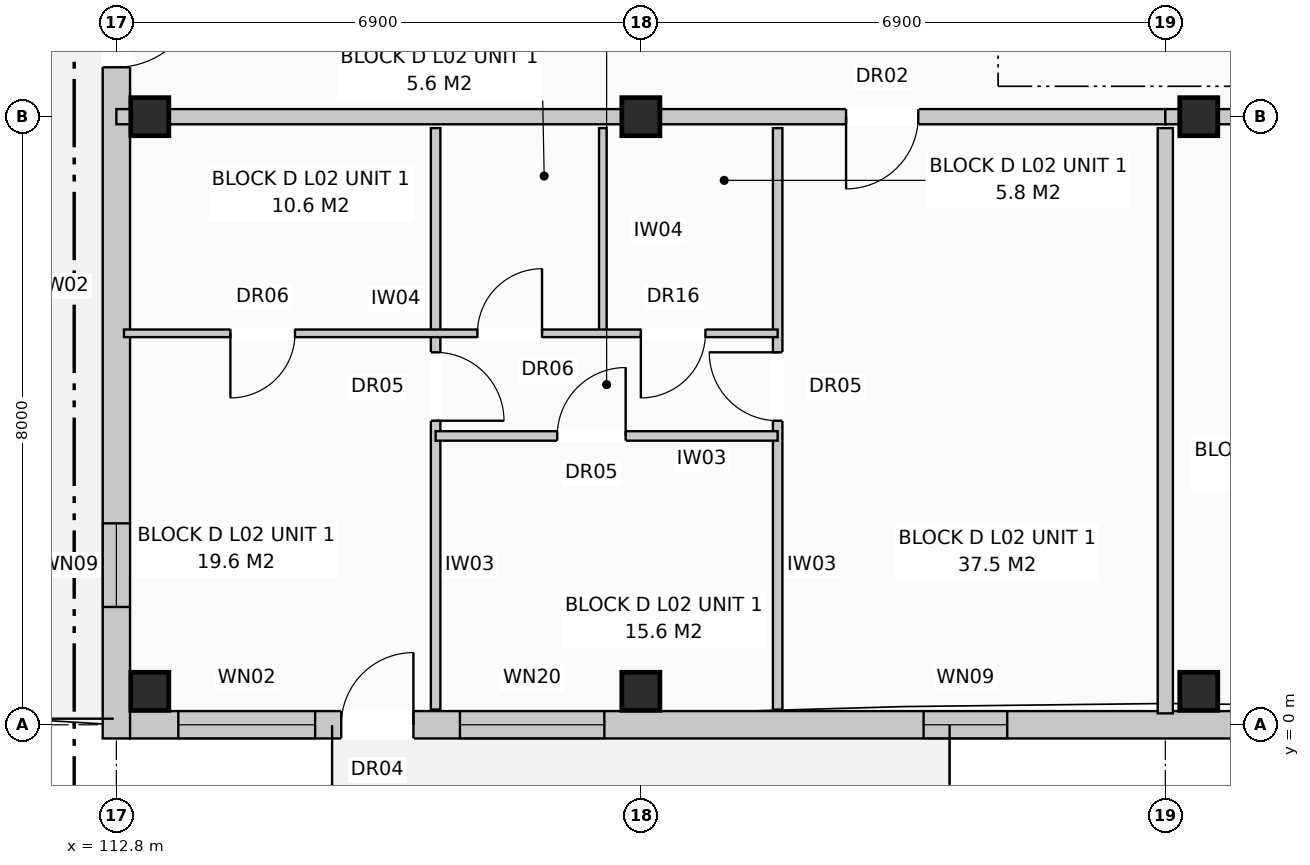
"""IFC4 building model, lengths in metres.
Left out: names, types, materials, properties, quantities, classifications, styles, units other than length and angle.
Written with IfcOpenShell. Run it as: python <this file> out.ifc"""

import sys

from ifc_helpers import new_model, si_unit, direction, frame, frame_2d, origin, origin_with_axes, origin_2d, place, context, subcontext, project, spatial, rectangle, extrude, element, fill, save


model = new_model("IFC4")
c1 = context("Model", 3, precision=1e-05, world=origin(), true_north=direction((0.0, 1.0)))
c2 = subcontext(c1, "Body", "Model", "MODEL_VIEW")
j1 = project(units=[si_unit("LENGTHUNIT", "METRE"), si_unit("PLANEANGLEUNIT", "RADIAN")], contexts=[c1])
p1 = place(None, origin())
s1 = spatial("IfcSite", under=j1, at=p1, CompositionType="ELEMENT")
p2 = place(p1, origin())
s2 = spatial("IfcBuilding", under=s1, at=p2, CompositionType="ELEMENT")
p3 = place(p2, frame((0.0, 0.0, 8.0)))
s3 = spatial("IfcBuildingStorey", under=s2, at=p3, CompositionType="ELEMENT", Elevation=8.0)
for number, where, z_axis, x_axis in (
    (1, (113.24, 0.44, 0.0), (0.0, 0.0, 1.0), (1.0, 0.0, 0.0)),
    (2, (113.24, 8.0, 0.0), (0.0, 0.0, 1.0), (1.0, 0.0, 0.0)),
    (3, (119.7, 0.44, 0.0), (0.0, 0.0, 1.0), (1.0, 0.0, 0.0)),
    (4, (119.7, 8.0, 0.0), (0.0, 0.0, 1.0), (1.0, 0.0, 0.0)),
    (5, (127.04, 0.44, 0.0), (0.0, 0.0, 1.0), (1.0, 0.0, 0.0)),
    (6, (127.04, 8.0, 0.0), (0.0, 0.0, 1.0), (1.0, 0.0, 0.0)),
):
    element("IfcColumn", number, at=place(p3, frame(where, z_axis=z_axis, x_axis=x_axis)), inside=s3, PredefinedType="COLUMN", context=c2, shape_type="SweptSolid", body=[
        extrude(rectangle(XDim=0.5, YDim=0.5, at=origin_2d()), origin(), (0.0, 0.0, 1.0), 3.2),
    ])
p4 = place(p3, frame((112.97, 0.0, 0.0), z_axis=(0.0, 0.0, 1.0), x_axis=(1.0, 0.0, 0.0)))
e7 = element("IfcWall", 7, at=p4, inside=s3, PredefinedType="STANDARD", context=c2, shape_type="SweptSolid", body=[
    extrude(rectangle(XDim=54.86, YDim=0.36, at=frame_2d((27.43, 0.0))), origin(), (0.0, 0.0, 1.0), 2.94),
])
p5 = place(p4, frame((2.788, 0.0, 0.0)))
e8 = element("IfcOpeningElement", 8, at=p5, cuts=e7, PredefinedType="OPENING", context=c2, shape_type="SweptSolid", body=[
    extrude(rectangle(XDim=0.95, YDim=2.1, at=frame_2d((0.475, 1.05))), frame((0.0, 0.192, 0.0), z_axis=(0.0, -1.0, 0.0), x_axis=(1.0, 0.0, 0.0)), (0.0, 0.0, 1.0), 0.384),
])
p6 = place(p4, frame((18.9, 0.0, 0.0)))
e9 = element("IfcOpeningElement", 9, at=p6, cuts=e7, PredefinedType="OPENING", context=c2, shape_type="SweptSolid", body=[
    extrude(rectangle(XDim=0.95, YDim=2.1, at=frame_2d((0.475, 1.05))), frame((0.0, 0.192, 0.0), z_axis=(0.0, -1.0, 0.0), x_axis=(1.0, 0.0, 0.0)), (0.0, 0.0, 1.0), 0.384),
])
p7 = place(p4, frame((30.792, 0.0, 0.0)))
e10 = element("IfcOpeningElement", 10, at=p7, cuts=e7, PredefinedType="OPENING", context=c2, shape_type="SweptSolid", body=[
    extrude(rectangle(XDim=0.95, YDim=2.1, at=frame_2d((0.475, 1.05))), frame((0.0, 0.192, 0.0), z_axis=(0.0, -1.0, 0.0), x_axis=(1.0, 0.0, 0.0)), (0.0, 0.0, 1.0), 0.384),
])
p8 = place(p4, frame((45.191, 0.0, 0.0)))
e11 = element("IfcOpeningElement", 11, at=p8, cuts=e7, PredefinedType="OPENING", context=c2, shape_type="SweptSolid", body=[
    extrude(rectangle(XDim=0.95, YDim=2.1, at=frame_2d((0.475, 1.05))), frame((0.0, 0.192, 0.0), z_axis=(0.0, -1.0, 0.0), x_axis=(1.0, 0.0, 0.0)), (0.0, 0.0, 1.0), 0.384),
])
p9 = place(p4, frame((0.645, 0.0, 0.8)))
e12 = element("IfcOpeningElement", 12, at=p9, cuts=e7, PredefinedType="OPENING", context=c2, shape_type="SweptSolid", body=[
    extrude(rectangle(XDim=1.8, YDim=1.7, at=frame_2d((0.9, 0.85))), frame((0.0, 0.192, 0.0), z_axis=(0.0, -1.0, 0.0), x_axis=(1.0, 0.0, 0.0)), (0.0, 0.0, 1.0), 0.384),
])
p10 = place(p4, frame((4.35, 0.0, 0.72)))
e13 = element("IfcOpeningElement", 13, at=p10, cuts=e7, PredefinedType="OPENING", context=c2, shape_type="SweptSolid", body=[
    extrude(rectangle(XDim=1.9, YDim=1.85, at=frame_2d((0.95, 0.925))), frame((0.0, 0.192, 0.0), z_axis=(0.0, -1.0, 0.0), x_axis=(1.0, 0.0, 0.0)), (0.0, 0.0, 1.0), 0.384),
])
p11 = place(p4, frame((10.45, 0.0, 0.72)))
e14 = element("IfcOpeningElement", 14, at=p11, cuts=e7, PredefinedType="OPENING", context=c2, shape_type="SweptSolid", body=[
    extrude(rectangle(XDim=1.1, YDim=1.5, at=frame_2d((0.55, 0.75))), frame((0.0, 0.192, 0.0), z_axis=(0.0, -1.0, 0.0), x_axis=(1.0, 0.0, 0.0)), (0.0, 0.0, 1.0), 0.384),
])
p12 = place(p4, frame((15.05, 0.0, 0.72)))
e15 = element("IfcOpeningElement", 15, at=p12, cuts=e7, PredefinedType="OPENING", context=c2, shape_type="SweptSolid", body=[
    extrude(rectangle(XDim=1.1, YDim=1.5, at=frame_2d((0.55, 0.75))), frame((0.0, 0.192, 0.0), z_axis=(0.0, -1.0, 0.0), x_axis=(1.0, 0.0, 0.0)), (0.0, 0.0, 1.0), 0.384),
])
p13 = place(p4, frame((22.75, 0.0, 0.8)))
e16 = element("IfcOpeningElement", 16, at=p13, cuts=e7, PredefinedType="OPENING", context=c2, shape_type="SweptSolid", body=[
    extrude(rectangle(XDim=1.9, YDim=1.85, at=frame_2d((0.95, 0.925))), frame((0.0, 0.192, 0.0), z_axis=(0.0, -1.0, 0.0), x_axis=(1.0, 0.0, 0.0)), (0.0, 0.0, 1.0), 0.384),
])
p14 = place(p4, frame((28.85, 0.0, 0.72)))
e17 = element("IfcOpeningElement", 17, at=p14, cuts=e7, PredefinedType="OPENING", context=c2, shape_type="SweptSolid", body=[
    extrude(rectangle(XDim=1.1, YDim=1.5, at=frame_2d((0.55, 0.75))), frame((0.0, 0.192, 0.0), z_axis=(0.0, -1.0, 0.0), x_axis=(1.0, 0.0, 0.0)), (0.0, 0.0, 1.0), 0.384),
])
p15 = place(p4, frame((34.9, 0.0, 0.8)))
e18 = element("IfcOpeningElement", 18, at=p15, cuts=e7, PredefinedType="OPENING", context=c2, shape_type="SweptSolid", body=[
    extrude(rectangle(XDim=1.8, YDim=1.7, at=frame_2d((0.9, 0.85))), frame((0.0, 0.192, 0.0), z_axis=(0.0, -1.0, 0.0), x_axis=(1.0, 0.0, 0.0)), (0.0, 0.0, 1.0), 0.384),
])
p16 = place(p4, frame((38.65, 0.0, 0.72)))
e19 = element("IfcOpeningElement", 19, at=p16, cuts=e7, PredefinedType="OPENING", context=c2, shape_type="SweptSolid", body=[
    extrude(rectangle(XDim=1.1, YDim=1.5, at=frame_2d((0.55, 0.75))), frame((0.0, 0.192, 0.0), z_axis=(0.0, -1.0, 0.0), x_axis=(1.0, 0.0, 0.0)), (0.0, 0.0, 1.0), 0.384),
])
p17 = place(p4, frame((43.35, 0.0, 0.72)))
e20 = element("IfcOpeningElement", 20, at=p17, cuts=e7, PredefinedType="OPENING", context=c2, shape_type="SweptSolid", body=[
    extrude(rectangle(XDim=1.1, YDim=1.5, at=frame_2d((0.55, 0.75))), frame((0.0, 0.192, 0.0), z_axis=(0.0, -1.0, 0.0), x_axis=(1.0, 0.0, 0.0)), (0.0, 0.0, 1.0), 0.384),
])
p18 = place(p4, frame((48.7, 0.0, 0.8)))
e21 = element("IfcOpeningElement", 21, at=p18, cuts=e7, PredefinedType="OPENING", context=c2, shape_type="SweptSolid", body=[
    extrude(rectangle(XDim=1.8, YDim=1.7, at=frame_2d((0.9, 0.85))), frame((0.0, 0.192, 0.0), z_axis=(0.0, -1.0, 0.0), x_axis=(1.0, 0.0, 0.0)), (0.0, 0.0, 1.0), 0.384),
])
p19 = place(p4, frame((52.25, 0.0, 0.72)))
e22 = element("IfcOpeningElement", 22, at=p19, cuts=e7, PredefinedType="OPENING", context=c2, shape_type="SweptSolid", body=[
    extrude(rectangle(XDim=1.1, YDim=1.5, at=frame_2d((0.55, 0.75))), frame((0.0, 0.192, 0.0), z_axis=(0.0, -1.0, 0.0), x_axis=(1.0, 0.0, 0.0)), (0.0, 0.0, 1.0), 0.384),
])
p20 = place(p3, frame((112.8, -0.18, 0.0), z_axis=(0.0, 0.0, 1.0), x_axis=(0.0, 1.0, 0.0)))
e23 = element("IfcWall", 23, at=p20, inside=s3, PredefinedType="STANDARD", context=c2, shape_type="SweptSolid", body=[
    extrude(rectangle(XDim=18.76, YDim=0.36, at=frame_2d((9.38, 0.0))), origin(), (0.0, 0.0, 1.0), 2.94),
])
p21 = place(p20, frame((8.83, 0.0, 0.0)))
e24 = element("IfcOpeningElement", 24, at=p21, cuts=e23, PredefinedType="OPENING", context=c2, shape_type="SweptSolid", body=[
    extrude(rectangle(XDim=1.1, YDim=2.1, at=frame_2d((0.55, 1.05))), frame((0.0, 0.192, 0.0), z_axis=(0.0, -1.0, 0.0), x_axis=(1.0, 0.0, 0.0)), (0.0, 0.0, 1.0), 0.384),
])
p22 = place(p20, frame((1.73, 0.0, 0.72)))
e25 = element("IfcOpeningElement", 25, at=p22, cuts=e23, PredefinedType="OPENING", context=c2, shape_type="SweptSolid", body=[
    extrude(rectangle(XDim=1.1, YDim=1.5, at=frame_2d((0.55, 0.75))), frame((0.0, 0.192, 0.0), z_axis=(0.0, -1.0, 0.0), x_axis=(1.0, 0.0, 0.0)), (0.0, 0.0, 1.0), 0.384),
])
p23 = place(p20, frame((15.93, 0.0, 0.72)))
e26 = element("IfcOpeningElement", 26, at=p23, cuts=e23, PredefinedType="OPENING", context=c2, shape_type="SweptSolid", body=[
    extrude(rectangle(XDim=1.1, YDim=1.5, at=frame_2d((0.55, 0.75))), frame((0.0, 0.192, 0.0), z_axis=(0.0, -1.0, 0.0), x_axis=(1.0, 0.0, 0.0)), (0.0, 0.0, 1.0), 0.384),
])
p24 = place(p3, frame((126.6, 7.85, 0.0), z_axis=(0.0, 0.0, 1.0), x_axis=(0.0, -1.0, 0.0)))
e27 = element("IfcWall", 27, at=p24, inside=s3, PredefinedType="PARTITIONING", context=c2, shape_type="SweptSolid", body=[
    extrude(rectangle(XDim=7.7, YDim=0.2, at=frame_2d((3.85, 0.0))), origin(), (0.0, 0.0, 1.0), 2.94),
])
p25 = place(p3, frame((112.8, 8.0, 0.0), z_axis=(0.0, 0.0, 1.0), x_axis=(1.0, 0.0, 0.0)))
e28 = element("IfcWall", 28, at=p25, inside=s3, PredefinedType="PARTITIONING", context=c2, shape_type="SweptSolid", body=[
    extrude(rectangle(XDim=13.8, YDim=0.2, at=frame_2d((6.9, 0.0))), origin(), (0.0, 0.0, 1.0), 2.38),
])
p26 = place(p25, frame((9.6, 0.0, 0.0)))
e29 = element("IfcOpeningElement", 29, at=p26, cuts=e28, PredefinedType="OPENING", context=c2, shape_type="SweptSolid", body=[
    extrude(rectangle(XDim=0.95, YDim=2.15, at=frame_2d((0.475, 1.075))), frame((0.0, 0.112, 0.0), z_axis=(0.0, -1.0, 0.0), x_axis=(1.0, 0.0, 0.0)), (0.0, 0.0, 1.0), 0.224),
])
p27 = place(p3, frame((121.5, 7.85, 0.0), z_axis=(0.0, 0.0, 1.0), x_axis=(0.0, -1.0, 0.0)))
e30 = element("IfcWall", 30, at=p27, inside=s3, PredefinedType="PARTITIONING", context=c2, shape_type="SweptSolid", body=[
    extrude(rectangle(XDim=7.65, YDim=0.125, at=frame_2d((3.825, 0.0))), origin(), (0.0, 0.0, 1.0), 2.94),
])
p28 = place(p27, frame((2.95, 0.0, 0.0)))
e31 = element("IfcOpeningElement", 31, at=p28, cuts=e30, PredefinedType="OPENING", context=c2, shape_type="SweptSolid", body=[
    extrude(rectangle(XDim=0.9, YDim=2.1, at=frame_2d((0.45, 1.05))), frame((0.0, 0.074, 0.0), z_axis=(0.0, -1.0, 0.0), x_axis=(1.0, 0.0, 0.0)), (0.0, 0.0, 1.0), 0.149),
])
p29 = place(p3, frame((117.0, 7.85, 0.0), z_axis=(0.0, 0.0, 1.0), x_axis=(0.0, -1.0, 0.0)))
e32 = element("IfcWall", 32, at=p29, inside=s3, PredefinedType="PARTITIONING", context=c2, shape_type="SweptSolid", body=[
    extrude(rectangle(XDim=7.65, YDim=0.125, at=frame_2d((3.825, 0.0))), origin(), (0.0, 0.0, 1.0), 2.94),
])
p30 = place(p29, frame((2.95, 0.0, 0.0)))
e33 = element("IfcOpeningElement", 33, at=p30, cuts=e32, PredefinedType="OPENING", context=c2, shape_type="SweptSolid", body=[
    extrude(rectangle(XDim=0.9, YDim=2.1, at=frame_2d((0.45, 1.05))), frame((0.0, 0.074, 0.0), z_axis=(0.0, -1.0, 0.0), x_axis=(1.0, 0.0, 0.0)), (0.0, 0.0, 1.0), 0.149),
])
p31 = place(p3, frame((119.2, 7.85, 0.0), z_axis=(0.0, 0.0, 1.0), x_axis=(0.0, -1.0, 0.0)))
e34 = element("IfcWall", 34, at=p31, inside=s3, PredefinedType="PARTITIONING", context=c2, shape_type="SweptSolid", body=[
    extrude(rectangle(XDim=2.7, YDim=0.1, at=frame_2d((1.35, 0.0))), origin(), (0.0, 0.0, 1.0), 2.94),
])
p32 = place(p3, frame((112.9, 5.15, 0.0), z_axis=(0.0, 0.0, 1.0), x_axis=(1.0, 0.0, 0.0)))
e35 = element("IfcWall", 35, at=p32, inside=s3, PredefinedType="PARTITIONING", context=c2, shape_type="SweptSolid", body=[
    extrude(rectangle(XDim=8.6, YDim=0.1, at=frame_2d((4.3, 0.0))), origin(), (0.0, 0.0, 1.0), 2.94),
])
p33 = place(p32, frame((1.4, 0.0, 0.0)))
e36 = element("IfcOpeningElement", 36, at=p33, cuts=e35, PredefinedType="OPENING", context=c2, shape_type="SweptSolid", body=[
    extrude(rectangle(XDim=0.85, YDim=2.05, at=frame_2d((0.425, 1.025))), frame((0.0, 0.062, 0.0), z_axis=(0.0, -1.0, 0.0), x_axis=(1.0, 0.0, 0.0)), (0.0, 0.0, 1.0), 0.124),
])
p34 = place(p32, frame((4.65, 0.0, 0.0)))
e37 = element("IfcOpeningElement", 37, at=p34, cuts=e35, PredefinedType="OPENING", context=c2, shape_type="SweptSolid", body=[
    extrude(rectangle(XDim=0.85, YDim=2.05, at=frame_2d((0.425, 1.025))), frame((0.0, 0.062, 0.0), z_axis=(0.0, -1.0, 0.0), x_axis=(1.0, 0.0, 0.0)), (0.0, 0.0, 1.0), 0.124),
])
p35 = place(p32, frame((6.8, 0.0, 0.0)))
e38 = element("IfcOpeningElement", 38, at=p35, cuts=e35, PredefinedType="OPENING", context=c2, shape_type="SweptSolid", body=[
    extrude(rectangle(XDim=0.85, YDim=2.1, at=frame_2d((0.425, 1.05))), frame((0.0, 0.062, 0.0), z_axis=(0.0, -1.0, 0.0), x_axis=(1.0, 0.0, 0.0)), (0.0, 0.0, 1.0), 0.124),
])
p36 = place(p3, frame((117.0, 3.8, 0.0), z_axis=(0.0, 0.0, 1.0), x_axis=(1.0, 0.0, 0.0)))
e39 = element("IfcWall", 39, at=p36, inside=s3, PredefinedType="PARTITIONING", context=c2, shape_type="SweptSolid", body=[
    extrude(rectangle(XDim=4.5, YDim=0.125, at=frame_2d((2.25, 0.0))), origin(), (0.0, 0.0, 1.0), 2.94),
])
p37 = place(p36, frame((1.6, 0.0, 0.0)))
e40 = element("IfcOpeningElement", 40, at=p37, cuts=e39, PredefinedType="OPENING", context=c2, shape_type="SweptSolid", body=[
    extrude(rectangle(XDim=0.9, YDim=2.1, at=frame_2d((0.45, 1.05))), frame((0.0, 0.074, 0.0), z_axis=(0.0, -1.0, 0.0), x_axis=(1.0, 0.0, 0.0)), (0.0, 0.0, 1.0), 0.149),
])
p38 = place(p3, frame((126.6, 8.0, 0.0), z_axis=(0.0, 0.0, 1.0), x_axis=(1.0, 0.0, 0.0)))
e41 = element("IfcWall", 41, at=p38, inside=s3, PredefinedType="PARTITIONING", context=c2, shape_type="SweptSolid", body=[
    extrude(rectangle(XDim=6.9, YDim=0.2, at=frame_2d((3.45, 0.0))), origin(), (0.0, 0.0, 1.0), 2.38),
])
p39 = place(p38, frame((2.0, 0.0, 0.0)))
e42 = element("IfcOpeningElement", 42, at=p39, cuts=e41, PredefinedType="OPENING", context=c2, shape_type="SweptSolid", body=[
    extrude(rectangle(XDim=0.95, YDim=2.15, at=frame_2d((0.475, 1.075))), frame((0.0, 0.112, 0.0), z_axis=(0.0, -1.0, 0.0), x_axis=(1.0, 0.0, 0.0)), (0.0, 0.0, 1.0), 0.224),
])
p40 = place(p5, origin_with_axes())
e43 = element("IfcDoor", 43, at=p40, inside=s3, OperationType="SINGLE_SWING_RIGHT", PredefinedType="DOOR", context=c2, shape_type="SweptSolid", body=[
    extrude(rectangle(XDim=0.95, YDim=2.1, at=frame_2d((0.475, 1.05))), frame((0.0, 0.025, 0.0), z_axis=(0.0, -1.0, 0.0), x_axis=(1.0, 0.0, 0.0)), (0.0, 0.0, 1.0), 0.05),
])
fill(e8, e43)
p41 = place(p9, origin_with_axes())
e44 = element("IfcWindow", 44, at=p41, inside=s3, PartitioningType="SINGLE_PANEL", PredefinedType="WINDOW", context=c2, shape_type="SweptSolid", body=[
    extrude(rectangle(XDim=1.8, YDim=1.7, at=frame_2d((0.9, 0.85))), frame((0.0, 0.03, 0.0), z_axis=(0.0, -1.0, 0.0), x_axis=(1.0, 0.0, 0.0)), (0.0, 0.0, 1.0), 0.06),
])
fill(e12, e44)
p42 = place(p10, origin_with_axes())
e45 = element("IfcWindow", 45, at=p42, inside=s3, PartitioningType="SINGLE_PANEL", PredefinedType="WINDOW", context=c2, shape_type="SweptSolid", body=[
    extrude(rectangle(XDim=1.9, YDim=1.85, at=frame_2d((0.95, 0.925))), frame((0.0, 0.03, 0.0), z_axis=(0.0, -1.0, 0.0), x_axis=(1.0, 0.0, 0.0)), (0.0, 0.0, 1.0), 0.06),
])
fill(e13, e45)
p43 = place(p11, origin_with_axes())
e46 = element("IfcWindow", 46, at=p43, inside=s3, PartitioningType="SINGLE_PANEL", PredefinedType="WINDOW", context=c2, shape_type="SweptSolid", body=[
    extrude(rectangle(XDim=1.1, YDim=1.5, at=frame_2d((0.55, 0.75))), frame((0.0, 0.03, 0.0), z_axis=(0.0, -1.0, 0.0), x_axis=(1.0, 0.0, 0.0)), (0.0, 0.0, 1.0), 0.06),
])
fill(e14, e46)
p44 = place(p21, frame((1.1, 0.0, 0.0), z_axis=(0.0, 0.0, 1.0), x_axis=(-1.0, 0.0, 0.0)))
e47 = element("IfcDoor", 47, at=p44, inside=s3, OperationType="SINGLE_SWING_RIGHT", PredefinedType="DOOR", context=c2, shape_type="SweptSolid", body=[
    extrude(rectangle(XDim=1.1, YDim=2.1, at=frame_2d((0.55, 1.05))), frame((0.0, 0.025, 0.0), z_axis=(0.0, -1.0, 0.0), x_axis=(1.0, 0.0, 0.0)), (0.0, 0.0, 1.0), 0.05),
])
fill(e24, e47)
p45 = place(p22, origin_with_axes())
e48 = element("IfcWindow", 48, at=p45, inside=s3, PartitioningType="SINGLE_PANEL", PredefinedType="WINDOW", context=c2, shape_type="SweptSolid", body=[
    extrude(rectangle(XDim=1.1, YDim=1.5, at=frame_2d((0.55, 0.75))), frame((0.0, 0.03, 0.0), z_axis=(0.0, -1.0, 0.0), x_axis=(1.0, 0.0, 0.0)), (0.0, 0.0, 1.0), 0.06),
])
fill(e25, e48)
p46 = place(p26, frame((0.95, 0.0, 0.0), z_axis=(0.0, 0.0, 1.0), x_axis=(-1.0, 0.0, 0.0)))
e49 = element("IfcDoor", 49, at=p46, inside=s3, OperationType="SINGLE_SWING_LEFT", PredefinedType="DOOR", context=c2, shape_type="SweptSolid", body=[
    extrude(rectangle(XDim=0.95, YDim=2.15, at=frame_2d((0.475, 1.075))), frame((0.0, 0.025, 0.0), z_axis=(0.0, -1.0, 0.0), x_axis=(1.0, 0.0, 0.0)), (0.0, 0.0, 1.0), 0.05),
])
fill(e29, e49)
p47 = place(p28, frame((0.9, 0.0, 0.0), z_axis=(0.0, 0.0, 1.0), x_axis=(-1.0, 0.0, 0.0)))
e50 = element("IfcDoor", 50, at=p47, inside=s3, OperationType="SINGLE_SWING_LEFT", PredefinedType="DOOR", context=c2, shape_type="SweptSolid", body=[
    extrude(rectangle(XDim=0.9, YDim=2.1, at=frame_2d((0.45, 1.05))), frame((0.0, 0.025, 0.0), z_axis=(0.0, -1.0, 0.0), x_axis=(1.0, 0.0, 0.0)), (0.0, 0.0, 1.0), 0.05),
])
fill(e31, e50)
p48 = place(p30, origin_with_axes())
e51 = element("IfcDoor", 51, at=p48, inside=s3, OperationType="SINGLE_SWING_RIGHT", PredefinedType="DOOR", context=c2, shape_type="SweptSolid", body=[
    extrude(rectangle(XDim=0.9, YDim=2.1, at=frame_2d((0.45, 1.05))), frame((0.0, 0.025, 0.0), z_axis=(0.0, -1.0, 0.0), x_axis=(1.0, 0.0, 0.0)), (0.0, 0.0, 1.0), 0.05),
])
fill(e33, e51)
p49 = place(p33, frame((0.85, 0.0, 0.0), z_axis=(0.0, 0.0, 1.0), x_axis=(-1.0, 0.0, 0.0)))
e52 = element("IfcDoor", 52, at=p49, inside=s3, OperationType="SINGLE_SWING_LEFT", PredefinedType="DOOR", context=c2, shape_type="SweptSolid", body=[
    extrude(rectangle(XDim=0.85, YDim=2.05, at=frame_2d((0.425, 1.025))), frame((0.0, 0.025, 0.0), z_axis=(0.0, -1.0, 0.0), x_axis=(1.0, 0.0, 0.0)), (0.0, 0.0, 1.0), 0.05),
])
fill(e36, e52)
p50 = place(p34, origin_with_axes())
e53 = element("IfcDoor", 53, at=p50, inside=s3, OperationType="SINGLE_SWING_RIGHT", PredefinedType="DOOR", context=c2, shape_type="SweptSolid", body=[
    extrude(rectangle(XDim=0.85, YDim=2.05, at=frame_2d((0.425, 1.025))), frame((0.0, 0.025, 0.0), z_axis=(0.0, -1.0, 0.0), x_axis=(1.0, 0.0, 0.0)), (0.0, 0.0, 1.0), 0.05),
])
fill(e37, e53)
p51 = place(p35, frame((0.85, 0.0, 0.0), z_axis=(0.0, 0.0, 1.0), x_axis=(-1.0, 0.0, 0.0)))
e54 = element("IfcDoor", 54, at=p51, inside=s3, OperationType="SINGLE_SWING_LEFT", PredefinedType="DOOR", context=c2, shape_type="SweptSolid", body=[
    extrude(rectangle(XDim=0.85, YDim=2.1, at=frame_2d((0.425, 1.05))), frame((0.0, 0.025, 0.0), z_axis=(0.0, -1.0, 0.0), x_axis=(1.0, 0.0, 0.0)), (0.0, 0.0, 1.0), 0.05),
])
fill(e38, e54)
p52 = place(p37, origin_with_axes())
e55 = element("IfcDoor", 55, at=p52, inside=s3, OperationType="SINGLE_SWING_RIGHT", PredefinedType="DOOR", context=c2, shape_type="SweptSolid", body=[
    extrude(rectangle(XDim=0.9, YDim=2.1, at=frame_2d((0.45, 1.05))), frame((0.0, 0.025, 0.0), z_axis=(0.0, -1.0, 0.0), x_axis=(1.0, 0.0, 0.0)), (0.0, 0.0, 1.0), 0.05),
])
fill(e40, e55)
save(model, sys.argv[1])
